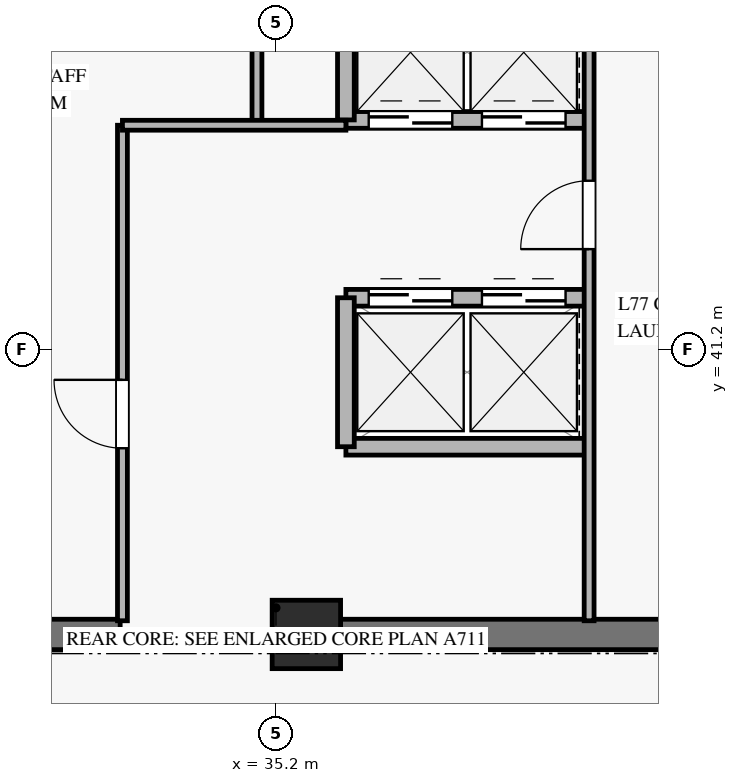
"""IFC4 building model, lengths in metres.
Left out: names, types, materials, properties, quantities, classifications, styles, units other than length and angle.
Written with IfcOpenShell. Run it as: python <this file> out.ifc"""

import sys

from ifc_helpers import new_model, si_unit, direction, frame, frame_2d, origin, origin_2d, place, context, subcontext, project, spatial, rectangle, extrude, source, transform, mapped, element, fill, save


model = new_model("IFC4")
c1 = context("Model", 3, precision=1e-05, world=origin(), true_north=direction((0.0, 1.0)))
c2 = subcontext(c1, "Body", "Model", "MODEL_VIEW")
j1 = project(units=[si_unit("LENGTHUNIT", "METRE"), si_unit("PLANEANGLEUNIT", "RADIAN")], contexts=[c1])
p1 = place(None, origin())
s1 = spatial("IfcSite", under=j1, at=p1, CompositionType="ELEMENT")
p2 = place(p1, origin())
s2 = spatial("IfcBuilding", under=s1, at=p2, CompositionType="ELEMENT")
p3 = place(p2, frame((0.0, 0.0, 300.6)))
s3 = spatial("IfcBuildingStorey", under=s2, at=p3, CompositionType="ELEMENT", Elevation=300.6)
m1 = source(origin(), c2, "Body", "SweptSolid", [
    extrude(rectangle(XDim=0.9, YDim=0.9, at=origin_2d()), origin(), (0.0, 0.0, 1.0), 3.185),
])
p4 = place(p3, frame((35.6, 37.45, 0.0), z_axis=(0.0, 0.0, 1.0), x_axis=(1.0, 0.0, 0.0)))
e1 = element("IfcColumn", 1, at=p4, inside=s3, PredefinedType="PILASTER", context=c2, shape_type="MappedRepresentation", body=[
    mapped(m1, transform((0.0, 0.0, 0.0), x_axis=(1.0, 0.0, 0.0), y_axis=(0.0, 1.0, 0.0), z_axis=(0.0, 0.0, 1.0), scale=1.0)),
])
p5 = place(p3, frame((31.25, 37.45, 0.0), z_axis=(0.0, 0.0, 1.0), x_axis=(1.0, 0.0, 0.0)))
e2 = element("IfcWall", 2, at=p5, inside=s3, PredefinedType="SHEAR", context=c2, shape_type="SweptSolid", body=[
    extrude(rectangle(XDim=1.9, YDim=0.4, at=frame_2d((0.95, 0.0))), origin(), (0.0, 0.0, 1.0), 3.185),
])
p6 = place(p3, frame((36.05, 37.45, 0.0), z_axis=(0.0, 0.0, 1.0), x_axis=(1.0, 0.0, 0.0)))
e3 = element("IfcWall", 3, at=p6, inside=s3, PredefinedType="SHEAR", context=c2, shape_type="SweptSolid", body=[
    extrude(rectangle(XDim=7.8, YDim=0.4, at=frame_2d((3.9, 0.0))), origin(), (0.0, 0.0, 1.0), 3.185),
])
p7 = place(p3, frame((36.12, 44.22, 0.0), z_axis=(0.0, 0.0, 1.0), x_axis=(1.0, 0.0, 0.0)))
e4 = element("IfcWall", 4, at=p7, inside=s3, PredefinedType="SOLIDWALL", context=c2, shape_type="SweptSolid", body=[
    extrude(rectangle(XDim=3.2, YDim=0.22, at=frame_2d((1.6, 0.0))), origin(), (0.0, 0.0, 1.0), 3.185),
])
p8 = place(p7, frame((0.3, 0.0, 0.0)))
e5 = element("IfcOpeningElement", 5, at=p8, cuts=e4, PredefinedType="OPENING", context=c2, shape_type="SweptSolid", body=[
    extrude(rectangle(XDim=1.1, YDim=2.2, at=frame_2d((0.55, 1.1))), frame((0.0, 0.12, 0.0), z_axis=(0.0, -1.0, 0.0), x_axis=(1.0, 0.0, 0.0)), (0.0, 0.0, 1.0), 0.24),
])
p9 = place(p7, frame((1.79, 0.0, 0.0)))
e6 = element("IfcOpeningElement", 6, at=p9, cuts=e4, PredefinedType="OPENING", context=c2, shape_type="SweptSolid", body=[
    extrude(rectangle(XDim=1.1, YDim=2.2, at=frame_2d((0.55, 1.1))), frame((0.0, 0.12, 0.0), z_axis=(0.0, -1.0, 0.0), x_axis=(1.0, 0.0, 0.0)), (0.0, 0.0, 1.0), 0.24),
])
p10 = place(p3, frame((36.12, 41.88, 0.0), z_axis=(0.0, 0.0, 1.0), x_axis=(1.0, 0.0, 0.0)))
e7 = element("IfcWall", 7, at=p10, inside=s3, PredefinedType="SOLIDWALL", context=c2, shape_type="SweptSolid", body=[
    extrude(rectangle(XDim=3.2, YDim=0.22, at=frame_2d((1.6, 0.0))), origin(), (0.0, 0.0, 1.0), 3.185),
])
p11 = place(p10, frame((0.3, 0.0, 0.0)))
e8 = element("IfcOpeningElement", 8, at=p11, cuts=e7, PredefinedType="OPENING", context=c2, shape_type="SweptSolid", body=[
    extrude(rectangle(XDim=1.1, YDim=2.2, at=frame_2d((0.55, 1.1))), frame((0.0, 0.12, 0.0), z_axis=(0.0, -1.0, 0.0), x_axis=(1.0, 0.0, 0.0)), (0.0, 0.0, 1.0), 0.24),
])
p12 = place(p10, frame((1.79, 0.0, 0.0)))
e9 = element("IfcOpeningElement", 9, at=p12, cuts=e7, PredefinedType="OPENING", context=c2, shape_type="SweptSolid", body=[
    extrude(rectangle(XDim=1.1, YDim=2.2, at=frame_2d((0.55, 1.1))), frame((0.0, 0.12, 0.0), z_axis=(0.0, -1.0, 0.0), x_axis=(1.0, 0.0, 0.0)), (0.0, 0.0, 1.0), 0.24),
])
p13 = place(p3, frame((36.12, 39.92, 0.0), z_axis=(0.0, 0.0, 1.0), x_axis=(1.0, 0.0, 0.0)))
e10 = element("IfcWall", 10, at=p13, inside=s3, PredefinedType="SOLIDWALL", context=c2, shape_type="SweptSolid", body=[
    extrude(rectangle(XDim=3.2, YDim=0.22, at=frame_2d((1.6, 0.0))), origin(), (0.0, 0.0, 1.0), 3.185),
])
p14 = place(p3, frame((36.12, 39.92, 0.0), z_axis=(0.0, 0.0, 1.0), x_axis=(0.0, 1.0, 0.0)))
e11 = element("IfcWall", 11, at=p14, inside=s3, PredefinedType="SOLIDWALL", context=c2, shape_type="SweptSolid", body=[
    extrude(rectangle(XDim=1.96, YDim=0.22, at=frame_2d((0.98, 0.0))), origin(), (0.0, 0.0, 1.0), 3.185),
])
p15 = place(p3, frame((36.12, 44.22, 0.0), z_axis=(0.0, 0.0, 1.0), x_axis=(0.0, 1.0, 0.0)))
e12 = element("IfcWall", 12, at=p15, inside=s3, PredefinedType="SOLIDWALL", context=c2, shape_type="SweptSolid", body=[
    extrude(rectangle(XDim=2.15, YDim=0.22, at=frame_2d((1.075, 0.0))), origin(), (0.0, 0.0, 1.0), 3.185),
])
p16 = place(p3, frame((33.18, 37.63, 0.0), z_axis=(0.0, 0.0, 1.0), x_axis=(0.0, 1.0, 0.0)))
e13 = element("IfcWall", 13, at=p16, inside=s3, PredefinedType="PARTITIONING", context=c2, shape_type="SweptSolid", body=[
    extrude(rectangle(XDim=6.52, YDim=0.13, at=frame_2d((3.26, 0.0))), origin(), (0.0, 0.0, 1.0), 2.27),
])
p17 = place(p16, frame((2.27, 0.0, 0.0)))
e14 = element("IfcOpeningElement", 14, at=p17, cuts=e13, PredefinedType="OPENING", context=c2, shape_type="SweptSolid", body=[
    extrude(rectangle(XDim=0.9, YDim=2.1, at=frame_2d((0.45, 1.05))), frame((0.0, 0.075, 0.0), z_axis=(0.0, -1.0, 0.0), x_axis=(1.0, 0.0, 0.0)), (0.0, 0.0, 1.0), 0.15),
])
p18 = place(p3, frame((34.95, 44.15, 0.0), z_axis=(0.0, 0.0, 1.0), x_axis=(0.0, 1.0, 0.0)))
e15 = element("IfcWall", 15, at=p18, inside=s3, PredefinedType="PARTITIONING", context=c2, shape_type="SweptSolid", body=[
    extrude(rectangle(XDim=2.22, YDim=0.13, at=frame_2d((1.11, 0.0))), origin(), (0.0, 0.0, 1.0), 3.185),
])
p19 = place(p3, frame((33.18, 44.15, 0.0), z_axis=(0.0, 0.0, 1.0), x_axis=(1.0, 0.0, 0.0)))
e16 = element("IfcWall", 16, at=p19, inside=s3, PredefinedType="PARTITIONING", context=c2, shape_type="SweptSolid", body=[
    extrude(rectangle(XDim=2.94, YDim=0.13, at=frame_2d((1.47, 0.0))), origin(), (0.0, 0.0, 1.0), 2.47),
])
p20 = place(p3, frame((39.32, 37.63, 0.0), z_axis=(0.0, 0.0, 1.0), x_axis=(0.0, 1.0, 0.0)))
e17 = element("IfcWall", 17, at=p20, inside=s3, PredefinedType="PARTITIONING", context=c2, shape_type="SweptSolid", body=[
    extrude(rectangle(XDim=8.74, YDim=0.13, at=frame_2d((4.37, 0.0))), origin(), (0.0, 0.0, 1.0), 3.185),
])
p21 = place(p20, frame((4.89, 0.0, 0.0)))
e18 = element("IfcOpeningElement", 18, at=p21, cuts=e17, PredefinedType="OPENING", context=c2, shape_type="SweptSolid", body=[
    extrude(rectangle(XDim=0.9, YDim=2.1, at=frame_2d((0.45, 1.05))), frame((0.0, 0.075, 0.0), z_axis=(0.0, -1.0, 0.0), x_axis=(1.0, 0.0, 0.0)), (0.0, 0.0, 1.0), 0.15),
])
m2 = source(origin(), c2, "Body", "SweptSolid", [
    extrude(rectangle(XDim=1.1, YDim=2.2, at=frame_2d((0.55, 1.1))), frame((0.0, 0.025, 0.0), z_axis=(0.0, -1.0, 0.0), x_axis=(1.0, 0.0, 0.0)), (0.0, 0.0, 1.0), 0.05),
])
p22 = place(p8, origin())
e19 = element("IfcDoor", 19, at=p22, inside=s3, OperationType="SLIDING_TO_LEFT", PredefinedType="DOOR", context=c2, shape_type="MappedRepresentation", body=[
    mapped(m2, transform((0.0, 0.0, 0.0), x_axis=(1.0, 0.0, 0.0), y_axis=(0.0, 1.0, 0.0), z_axis=(0.0, 0.0, 1.0), scale=1.0)),
])
fill(e5, e19)
p23 = place(p9, origin())
e20 = element("IfcDoor", 20, at=p23, inside=s3, OperationType="SLIDING_TO_LEFT", PredefinedType="DOOR", context=c2, shape_type="MappedRepresentation", body=[
    mapped(m2, transform((0.0, 0.0, 0.0), x_axis=(1.0, 0.0, 0.0), y_axis=(0.0, 1.0, 0.0), z_axis=(0.0, 0.0, 1.0), scale=1.0)),
])
fill(e6, e20)
p24 = place(p11, origin())
e21 = element("IfcDoor", 21, at=p24, inside=s3, OperationType="SLIDING_TO_LEFT", PredefinedType="DOOR", context=c2, shape_type="MappedRepresentation", body=[
    mapped(m2, transform((0.0, 0.0, 0.0), x_axis=(1.0, 0.0, 0.0), y_axis=(0.0, 1.0, 0.0), z_axis=(0.0, 0.0, 1.0), scale=1.0)),
])
fill(e8, e21)
p25 = place(p12, origin())
e22 = element("IfcDoor", 22, at=p25, inside=s3, OperationType="SLIDING_TO_LEFT", PredefinedType="DOOR", context=c2, shape_type="MappedRepresentation", body=[
    mapped(m2, transform((0.0, 0.0, 0.0), x_axis=(1.0, 0.0, 0.0), y_axis=(0.0, 1.0, 0.0), z_axis=(0.0, 0.0, 1.0), scale=1.0)),
])
fill(e9, e22)
m3 = source(origin(), c2, "Body", "SweptSolid", [
    extrude(rectangle(XDim=0.9, YDim=2.1, at=frame_2d((0.45, 1.05))), frame((0.0, 0.025, 0.0), z_axis=(0.0, -1.0, 0.0), x_axis=(1.0, 0.0, 0.0)), (0.0, 0.0, 1.0), 0.05),
])
p26 = place(p17, origin())
e23 = element("IfcDoor", 23, at=p26, inside=s3, OperationType="SINGLE_SWING_RIGHT", PredefinedType="DOOR", context=c2, shape_type="MappedRepresentation", body=[
    mapped(m3, transform((0.0, 0.0, 0.0), x_axis=(1.0, 0.0, 0.0), y_axis=(0.0, 1.0, 0.0), z_axis=(0.0, 0.0, 1.0), scale=1.0)),
])
fill(e14, e23)
p27 = place(p21, origin())
e24 = element("IfcDoor", 24, at=p27, inside=s3, OperationType="SINGLE_SWING_LEFT", PredefinedType="DOOR", context=c2, shape_type="MappedRepresentation", body=[
    mapped(m3, transform((0.0, 0.0, 0.0), x_axis=(1.0, 0.0, 0.0), y_axis=(0.0, 1.0, 0.0), z_axis=(0.0, 0.0, 1.0), scale=1.0)),
])
fill(e18, e24)
save(model, sys.argv[1])
